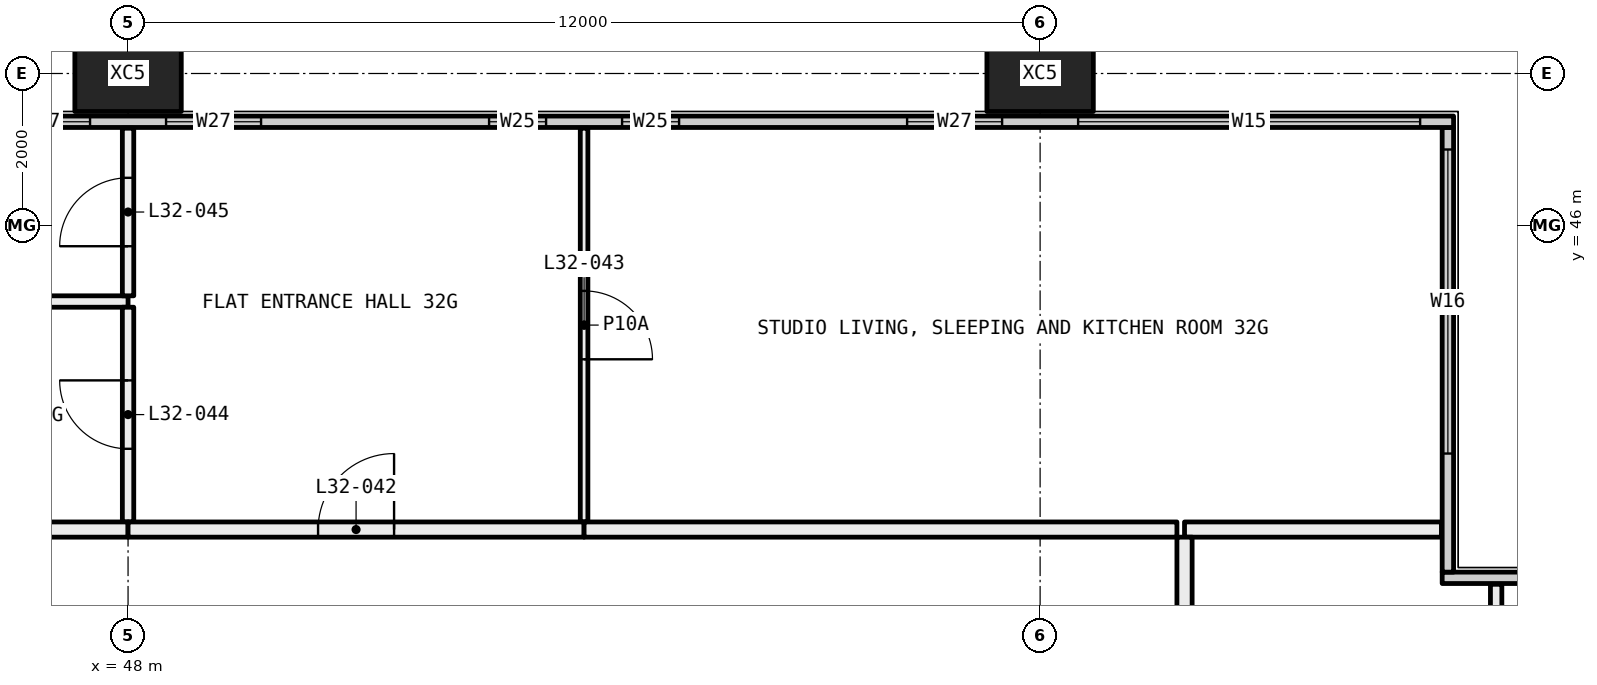
"""IFC4 building model, lengths in metres.
Left out: names, types, materials, properties, quantities, classifications, styles, units other than length and angle.
Written with IfcOpenShell. Run it as: python <this file> out.ifc"""

import sys

from ifc_helpers import new_model, si_unit, direction, frame, frame_2d, origin, origin_2d, place, context, subcontext, project, spatial, rectangle, hollow_rectangle, extrude, element, fill, save


model = new_model("IFC4")
c1 = context("Model", 3, precision=1e-05, world=origin(), true_north=direction((0.0, 1.0)))
c2 = subcontext(c1, "Body", "Model", "MODEL_VIEW")
j1 = project(units=[si_unit("LENGTHUNIT", "METRE"), si_unit("PLANEANGLEUNIT", "RADIAN")], contexts=[c1])
p1 = place(None, origin())
s1 = spatial("IfcSite", under=j1, at=p1, CompositionType="ELEMENT")
p2 = place(p1, origin())
s2 = spatial("IfcBuilding", under=s1, at=p2, CompositionType="ELEMENT")
p3 = place(p2, frame((0.0, 0.0, 124.2)))
s3 = spatial("IfcBuildingStorey", under=s2, at=p3, CompositionType="ELEMENT", Elevation=124.2)
for number, where, z_axis, x_axis in (
    (1, (48.0, 48.0, -0.4), (0.0, 0.0, 1.0), (1.0, 0.0, 0.0)),
    (2, (60.0, 48.0, -0.4), (0.0, 0.0, 1.0), (1.0, 0.0, 0.0)),
):
    element("IfcColumn", number, at=place(p3, frame(where, z_axis=z_axis, x_axis=x_axis)), inside=s3, PredefinedType="COLUMN", context=c2, shape_type="SweptSolid", body=[
        extrude(hollow_rectangle(XDim=1.4, YDim=1.0, WallThickness=0.055, at=origin_2d()), origin(), (0.0, 0.0, 1.0), 3.45),
    ])
p4 = place(p3, frame((65.29, 41.365, 0.0), z_axis=(0.0, 0.0, 1.0), x_axis=(1.0, 0.0, 0.0)))
e3 = element("IfcWall", 3, at=p4, inside=s3, PredefinedType="ELEMENTEDWALL", context=c2, shape_type="SweptSolid", body=[
    extrude(rectangle(XDim=6.15, YDim=0.15, at=frame_2d((3.075, 0.0))), origin(), (0.0, 0.0, 1.0), 3.05),
])
p5 = place(p4, frame((1.71, 0.0, 0.45)))
e4 = element("IfcOpeningElement", 4, at=p5, cuts=e3, PredefinedType="OPENING", context=c2, shape_type="SweptSolid", body=[
    extrude(rectangle(XDim=4.0, YDim=2.55, at=frame_2d((2.0, 1.275))), frame((0.0, 0.085, 0.0), z_axis=(0.0, -1.0, 0.0), x_axis=(1.0, 0.0, 0.0)), (0.0, 0.0, 1.0), 0.17),
])
p6 = place(p3, frame((65.365, 41.44, 0.0), z_axis=(0.0, 0.0, 1.0), x_axis=(0.0, 1.0, 0.0)))
e5 = element("IfcWall", 5, at=p6, inside=s3, PredefinedType="ELEMENTEDWALL", context=c2, shape_type="SweptSolid", body=[
    extrude(rectangle(XDim=5.85, YDim=0.15, at=frame_2d((2.925, 0.0))), origin(), (0.0, 0.0, 1.0), 3.05),
])
p7 = place(p6, frame((1.56, 0.0, 0.45)))
e6 = element("IfcOpeningElement", 6, at=p7, cuts=e5, PredefinedType="OPENING", context=c2, shape_type="SweptSolid", body=[
    extrude(rectangle(XDim=4.0, YDim=2.55, at=frame_2d((2.0, 1.275))), frame((0.0, 0.085, 0.0), z_axis=(0.0, -1.0, 0.0), x_axis=(1.0, 0.0, 0.0)), (0.0, 0.0, 1.0), 0.17),
])
p8 = place(p3, frame((6.56, 47.365, 0.0), z_axis=(0.0, 0.0, 1.0), x_axis=(1.0, 0.0, 0.0)))
e7 = element("IfcWall", 7, at=p8, inside=s3, PredefinedType="ELEMENTEDWALL", context=c2, shape_type="SweptSolid", body=[
    extrude(rectangle(XDim=58.88, YDim=0.15, at=frame_2d((29.44, 0.0))), origin(), (0.0, 0.0, 1.0), 3.05),
])
p9 = place(p8, frame((0.44, 0.0, 0.45)))
e8 = element("IfcOpeningElement", 8, at=p9, cuts=e7, PredefinedType="OPENING", context=c2, shape_type="SweptSolid", body=[
    extrude(rectangle(XDim=4.5, YDim=2.55, at=frame_2d((2.25, 1.275))), frame((0.0, 0.085, 0.0), z_axis=(0.0, -1.0, 0.0), x_axis=(1.0, 0.0, 0.0)), (0.0, 0.0, 1.0), 0.17),
])
p10 = place(p8, frame((5.94, 0.0, 0.45)))
e9 = element("IfcOpeningElement", 9, at=p10, cuts=e7, PredefinedType="OPENING", context=c2, shape_type="SweptSolid", body=[
    extrude(rectangle(XDim=1.25, YDim=2.55, at=frame_2d((0.625, 1.275))), frame((0.0, 0.085, 0.0), z_axis=(0.0, -1.0, 0.0), x_axis=(1.0, 0.0, 0.0)), (0.0, 0.0, 1.0), 0.17),
])
p11 = place(p8, frame((10.19, 0.0, 0.45)))
e10 = element("IfcOpeningElement", 10, at=p11, cuts=e7, PredefinedType="OPENING", context=c2, shape_type="SweptSolid", body=[
    extrude(rectangle(XDim=0.75, YDim=2.55, at=frame_2d((0.375, 1.275))), frame((0.0, 0.085, 0.0), z_axis=(0.0, -1.0, 0.0), x_axis=(1.0, 0.0, 0.0)), (0.0, 0.0, 1.0), 0.17),
])
p12 = place(p8, frame((11.94, 0.0, 0.45)))
e11 = element("IfcOpeningElement", 11, at=p12, cuts=e7, PredefinedType="OPENING", context=c2, shape_type="SweptSolid", body=[
    extrude(rectangle(XDim=0.75, YDim=2.55, at=frame_2d((0.375, 1.275))), frame((0.0, 0.085, 0.0), z_axis=(0.0, -1.0, 0.0), x_axis=(1.0, 0.0, 0.0)), (0.0, 0.0, 1.0), 0.17),
])
p13 = place(p8, frame((15.69, 0.0, 0.45)))
e12 = element("IfcOpeningElement", 12, at=p13, cuts=e7, PredefinedType="OPENING", context=c2, shape_type="SweptSolid", body=[
    extrude(rectangle(XDim=1.25, YDim=2.55, at=frame_2d((0.625, 1.275))), frame((0.0, 0.085, 0.0), z_axis=(0.0, -1.0, 0.0), x_axis=(1.0, 0.0, 0.0)), (0.0, 0.0, 1.0), 0.17),
])
p14 = place(p8, frame((17.94, 0.0, 0.45)))
e13 = element("IfcOpeningElement", 13, at=p14, cuts=e7, PredefinedType="OPENING", context=c2, shape_type="SweptSolid", body=[
    extrude(rectangle(XDim=1.25, YDim=2.55, at=frame_2d((0.625, 1.275))), frame((0.0, 0.085, 0.0), z_axis=(0.0, -1.0, 0.0), x_axis=(1.0, 0.0, 0.0)), (0.0, 0.0, 1.0), 0.17),
])
p15 = place(p8, frame((22.19, 0.0, 0.45)))
e14 = element("IfcOpeningElement", 14, at=p15, cuts=e7, PredefinedType="OPENING", context=c2, shape_type="SweptSolid", body=[
    extrude(rectangle(XDim=0.75, YDim=2.55, at=frame_2d((0.375, 1.275))), frame((0.0, 0.085, 0.0), z_axis=(0.0, -1.0, 0.0), x_axis=(1.0, 0.0, 0.0)), (0.0, 0.0, 1.0), 0.17),
])
p16 = place(p8, frame((23.94, 0.0, 0.45)))
e15 = element("IfcOpeningElement", 15, at=p16, cuts=e7, PredefinedType="OPENING", context=c2, shape_type="SweptSolid", body=[
    extrude(rectangle(XDim=0.75, YDim=2.55, at=frame_2d((0.375, 1.275))), frame((0.0, 0.085, 0.0), z_axis=(0.0, -1.0, 0.0), x_axis=(1.0, 0.0, 0.0)), (0.0, 0.0, 1.0), 0.17),
])
p17 = place(p8, frame((27.69, 0.0, 0.45)))
e16 = element("IfcOpeningElement", 16, at=p17, cuts=e7, PredefinedType="OPENING", context=c2, shape_type="SweptSolid", body=[
    extrude(rectangle(XDim=1.25, YDim=2.55, at=frame_2d((0.625, 1.275))), frame((0.0, 0.085, 0.0), z_axis=(0.0, -1.0, 0.0), x_axis=(1.0, 0.0, 0.0)), (0.0, 0.0, 1.0), 0.17),
])
p18 = place(p8, frame((29.94, 0.0, 0.45)))
e17 = element("IfcOpeningElement", 17, at=p18, cuts=e7, PredefinedType="OPENING", context=c2, shape_type="SweptSolid", body=[
    extrude(rectangle(XDim=1.25, YDim=2.55, at=frame_2d((0.625, 1.275))), frame((0.0, 0.085, 0.0), z_axis=(0.0, -1.0, 0.0), x_axis=(1.0, 0.0, 0.0)), (0.0, 0.0, 1.0), 0.17),
])
p19 = place(p8, frame((34.19, 0.0, 0.45)))
e18 = element("IfcOpeningElement", 18, at=p19, cuts=e7, PredefinedType="OPENING", context=c2, shape_type="SweptSolid", body=[
    extrude(rectangle(XDim=0.75, YDim=2.55, at=frame_2d((0.375, 1.275))), frame((0.0, 0.085, 0.0), z_axis=(0.0, -1.0, 0.0), x_axis=(1.0, 0.0, 0.0)), (0.0, 0.0, 1.0), 0.17),
])
p20 = place(p8, frame((35.94, 0.0, 0.45)))
e19 = element("IfcOpeningElement", 19, at=p20, cuts=e7, PredefinedType="OPENING", context=c2, shape_type="SweptSolid", body=[
    extrude(rectangle(XDim=0.75, YDim=2.55, at=frame_2d((0.375, 1.275))), frame((0.0, 0.085, 0.0), z_axis=(0.0, -1.0, 0.0), x_axis=(1.0, 0.0, 0.0)), (0.0, 0.0, 1.0), 0.17),
])
p21 = place(p8, frame((39.69, 0.0, 0.45)))
e20 = element("IfcOpeningElement", 20, at=p21, cuts=e7, PredefinedType="OPENING", context=c2, shape_type="SweptSolid", body=[
    extrude(rectangle(XDim=1.25, YDim=2.55, at=frame_2d((0.625, 1.275))), frame((0.0, 0.085, 0.0), z_axis=(0.0, -1.0, 0.0), x_axis=(1.0, 0.0, 0.0)), (0.0, 0.0, 1.0), 0.17),
])
p22 = place(p8, frame((41.94, 0.0, 0.45)))
e21 = element("IfcOpeningElement", 21, at=p22, cuts=e7, PredefinedType="OPENING", context=c2, shape_type="SweptSolid", body=[
    extrude(rectangle(XDim=1.25, YDim=2.55, at=frame_2d((0.625, 1.275))), frame((0.0, 0.085, 0.0), z_axis=(0.0, -1.0, 0.0), x_axis=(1.0, 0.0, 0.0)), (0.0, 0.0, 1.0), 0.17),
])
p23 = place(p8, frame((46.19, 0.0, 0.45)))
e22 = element("IfcOpeningElement", 22, at=p23, cuts=e7, PredefinedType="OPENING", context=c2, shape_type="SweptSolid", body=[
    extrude(rectangle(XDim=0.75, YDim=2.55, at=frame_2d((0.375, 1.275))), frame((0.0, 0.085, 0.0), z_axis=(0.0, -1.0, 0.0), x_axis=(1.0, 0.0, 0.0)), (0.0, 0.0, 1.0), 0.17),
])
p24 = place(p8, frame((47.94, 0.0, 0.45)))
e23 = element("IfcOpeningElement", 23, at=p24, cuts=e7, PredefinedType="OPENING", context=c2, shape_type="SweptSolid", body=[
    extrude(rectangle(XDim=0.75, YDim=2.55, at=frame_2d((0.375, 1.275))), frame((0.0, 0.085, 0.0), z_axis=(0.0, -1.0, 0.0), x_axis=(1.0, 0.0, 0.0)), (0.0, 0.0, 1.0), 0.17),
])
p25 = place(p8, frame((51.69, 0.0, 0.45)))
e24 = element("IfcOpeningElement", 24, at=p25, cuts=e7, PredefinedType="OPENING", context=c2, shape_type="SweptSolid", body=[
    extrude(rectangle(XDim=1.25, YDim=2.55, at=frame_2d((0.625, 1.275))), frame((0.0, 0.085, 0.0), z_axis=(0.0, -1.0, 0.0), x_axis=(1.0, 0.0, 0.0)), (0.0, 0.0, 1.0), 0.17),
])
p26 = place(p8, frame((53.94, 0.0, 0.45)))
e25 = element("IfcOpeningElement", 25, at=p26, cuts=e7, PredefinedType="OPENING", context=c2, shape_type="SweptSolid", body=[
    extrude(rectangle(XDim=4.5, YDim=2.55, at=frame_2d((2.25, 1.275))), frame((0.0, 0.085, 0.0), z_axis=(0.0, -1.0, 0.0), x_axis=(1.0, 0.0, 0.0)), (0.0, 0.0, 1.0), 0.17),
])
p27 = place(p3, frame((66.0, 41.28, 0.0), z_axis=(0.0, 0.0, 1.0), x_axis=(0.0, -1.0, 0.0)))
e26 = element("IfcWall", 26, at=p27, inside=s3, PredefinedType="PARTITIONING", context=c2, shape_type="SweptSolid", body=[
    extrude(rectangle(XDim=3.78, YDim=0.15, at=frame_2d((1.89, 0.0))), origin(), (0.0, 0.0, 1.0), 3.05),
])
p28 = place(p3, frame((65.28, 42.0, 0.0), z_axis=(0.0, 0.0, 1.0), x_axis=(-1.0, 0.0, 0.0)))
e27 = element("IfcWall", 27, at=p28, inside=s3, PredefinedType="PARTITIONING", context=c2, shape_type="SweptSolid", body=[
    extrude(rectangle(XDim=3.38, YDim=0.2, at=frame_2d((1.69, 0.0))), origin(), (0.0, 0.0, 1.0), 3.05),
])
p29 = place(p3, frame((61.9, 41.9, 0.0), z_axis=(0.0, 0.0, 1.0), x_axis=(0.0, -1.0, 0.0)))
e28 = element("IfcWall", 28, at=p29, inside=s3, PredefinedType="PARTITIONING", context=c2, shape_type="SweptSolid", body=[
    extrude(rectangle(XDim=4.4, YDim=0.2, at=frame_2d((2.2, 0.0))), origin(), (0.0, 0.0, 1.0), 3.05),
])
p30 = place(p3, frame((48.0, 45.0, 0.0), z_axis=(0.0, 0.0, 1.0), x_axis=(-1.0, 0.0, 0.0)))
e29 = element("IfcWall", 29, at=p30, inside=s3, PredefinedType="PARTITIONING", context=c2, shape_type="SweptSolid", body=[
    extrude(rectangle(XDim=5.9, YDim=0.15, at=frame_2d((2.95, 0.0))), origin(), (0.0, 0.0, 1.0), 3.05),
])
p31 = place(p3, frame((48.0, 42.1, 0.0), z_axis=(0.0, 0.0, 1.0), x_axis=(0.0, 1.0, 0.0)))
e30 = element("IfcWall", 30, at=p31, inside=s3, PredefinedType="PARTITIONING", context=c2, shape_type="SweptSolid", body=[
    extrude(rectangle(XDim=2.825, YDim=0.15, at=frame_2d((1.413, 0.0))), origin(), (0.0, 0.0, 1.0), 3.05),
])
p32 = place(p31, frame((0.962, 0.0, 0.0)))
e31 = element("IfcOpeningElement", 31, at=p32, cuts=e30, PredefinedType="OPENING", context=c2, shape_type="SweptSolid", body=[
    extrude(rectangle(XDim=0.9, YDim=2.1, at=frame_2d((0.45, 1.05))), frame((0.0, 0.085, 0.0), z_axis=(0.0, -1.0, 0.0), x_axis=(1.0, 0.0, 0.0)), (0.0, 0.0, 1.0), 0.17),
])
p33 = place(p3, frame((46.1, 42.0, 0.0), z_axis=(0.0, 0.0, 1.0), x_axis=(1.0, 0.0, 0.0)))
e32 = element("IfcWall", 32, at=p33, inside=s3, PredefinedType="PARTITIONING", context=c2, shape_type="SweptSolid", body=[
    extrude(rectangle(XDim=1.9, YDim=0.2, at=frame_2d((0.95, 0.0))), origin(), (0.0, 0.0, 1.0), 3.05),
])
p34 = place(p3, frame((48.0, 45.075, 0.0), z_axis=(0.0, 0.0, 1.0), x_axis=(0.0, 1.0, 0.0)))
e33 = element("IfcWall", 33, at=p34, inside=s3, PredefinedType="PARTITIONING", context=c2, shape_type="SweptSolid", body=[
    extrude(rectangle(XDim=2.205, YDim=0.15, at=frame_2d((1.103, 0.0))), origin(), (0.0, 0.0, 1.0), 3.05),
])
p35 = place(p34, frame((0.653, 0.0, 0.0)))
e34 = element("IfcOpeningElement", 34, at=p35, cuts=e33, PredefinedType="OPENING", context=c2, shape_type="SweptSolid", body=[
    extrude(rectangle(XDim=0.9, YDim=2.1, at=frame_2d((0.45, 1.05))), frame((0.0, 0.085, 0.0), z_axis=(0.0, -1.0, 0.0), x_axis=(1.0, 0.0, 0.0)), (0.0, 0.0, 1.0), 0.17),
])
p36 = place(p3, frame((54.0, 42.1, 0.0), z_axis=(0.0, 0.0, 1.0), x_axis=(0.0, 1.0, 0.0)))
e35 = element("IfcWall", 35, at=p36, inside=s3, PredefinedType="PARTITIONING", context=c2, shape_type="SweptSolid", body=[
    extrude(rectangle(XDim=5.18, YDim=0.1, at=frame_2d((2.59, 0.0))), origin(), (0.0, 0.0, 1.0), 3.05),
])
p37 = place(p36, frame((2.14, 0.0, 0.0)))
e36 = element("IfcOpeningElement", 36, at=p37, cuts=e35, PredefinedType="OPENING", context=c2, shape_type="SweptSolid", body=[
    extrude(rectangle(XDim=0.9, YDim=2.1, at=frame_2d((0.45, 1.05))), frame((0.0, 0.06, 0.0), z_axis=(0.0, -1.0, 0.0), x_axis=(1.0, 0.0, 0.0)), (0.0, 0.0, 1.0), 0.12),
])
p38 = place(p3, frame((48.0, 42.0, 0.0), z_axis=(0.0, 0.0, 1.0), x_axis=(1.0, 0.0, 0.0)))
e37 = element("IfcWall", 37, at=p38, inside=s3, PredefinedType="PARTITIONING", context=c2, shape_type="SweptSolid", body=[
    extrude(rectangle(XDim=6.0, YDim=0.2, at=frame_2d((3.0, 0.0))), origin(), (0.0, 0.0, 1.0), 3.05),
])
p39 = place(p38, frame((2.5, 0.0, 0.0)))
e38 = element("IfcOpeningElement", 38, at=p39, cuts=e37, PredefinedType="OPENING", context=c2, shape_type="SweptSolid", body=[
    extrude(rectangle(XDim=1.0, YDim=2.1, at=frame_2d((0.5, 1.05))), frame((0.0, 0.11, 0.0), z_axis=(0.0, -1.0, 0.0), x_axis=(1.0, 0.0, 0.0)), (0.0, 0.0, 1.0), 0.22),
])
p40 = place(p3, frame((54.0, 42.0, 0.0), z_axis=(0.0, 0.0, 1.0), x_axis=(1.0, 0.0, 0.0)))
e39 = element("IfcWall", 39, at=p40, inside=s3, PredefinedType="PARTITIONING", context=c2, shape_type="SweptSolid", body=[
    extrude(rectangle(XDim=7.8, YDim=0.2, at=frame_2d((3.9, 0.0))), origin(), (0.0, 0.0, 1.0), 3.05),
])
p41 = place(p7, origin())
e40 = element("IfcWindow", 40, at=p41, inside=s3, PartitioningType="SINGLE_PANEL", PredefinedType="WINDOW", context=c2, shape_type="SweptSolid", body=[
    extrude(rectangle(XDim=4.0, YDim=2.55, at=frame_2d((2.0, 1.275))), frame((0.0, 0.03, 0.0), z_axis=(0.0, -1.0, 0.0), x_axis=(1.0, 0.0, 0.0)), (0.0, 0.0, 1.0), 0.06),
])
fill(e6, e40)
p42 = place(p21, origin())
e41 = element("IfcWindow", 41, at=p42, inside=s3, PartitioningType="SINGLE_PANEL", PredefinedType="WINDOW", context=c2, shape_type="SweptSolid", body=[
    extrude(rectangle(XDim=1.25, YDim=2.55, at=frame_2d((0.625, 1.275))), frame((0.0, 0.03, 0.0), z_axis=(0.0, -1.0, 0.0), x_axis=(1.0, 0.0, 0.0)), (0.0, 0.0, 1.0), 0.06),
])
fill(e20, e41)
p43 = place(p22, origin())
e42 = element("IfcWindow", 42, at=p43, inside=s3, PartitioningType="SINGLE_PANEL", PredefinedType="WINDOW", context=c2, shape_type="SweptSolid", body=[
    extrude(rectangle(XDim=1.25, YDim=2.55, at=frame_2d((0.625, 1.275))), frame((0.0, 0.03, 0.0), z_axis=(0.0, -1.0, 0.0), x_axis=(1.0, 0.0, 0.0)), (0.0, 0.0, 1.0), 0.06),
])
fill(e21, e42)
p44 = place(p23, origin())
e43 = element("IfcWindow", 43, at=p44, inside=s3, PartitioningType="SINGLE_PANEL", PredefinedType="WINDOW", context=c2, shape_type="SweptSolid", body=[
    extrude(rectangle(XDim=0.75, YDim=2.55, at=frame_2d((0.375, 1.275))), frame((0.0, 0.03, 0.0), z_axis=(0.0, -1.0, 0.0), x_axis=(1.0, 0.0, 0.0)), (0.0, 0.0, 1.0), 0.06),
])
fill(e22, e43)
p45 = place(p24, origin())
e44 = element("IfcWindow", 44, at=p45, inside=s3, PartitioningType="SINGLE_PANEL", PredefinedType="WINDOW", context=c2, shape_type="SweptSolid", body=[
    extrude(rectangle(XDim=0.75, YDim=2.55, at=frame_2d((0.375, 1.275))), frame((0.0, 0.03, 0.0), z_axis=(0.0, -1.0, 0.0), x_axis=(1.0, 0.0, 0.0)), (0.0, 0.0, 1.0), 0.06),
])
fill(e23, e44)
p46 = place(p25, origin())
e45 = element("IfcWindow", 45, at=p46, inside=s3, PartitioningType="SINGLE_PANEL", PredefinedType="WINDOW", context=c2, shape_type="SweptSolid", body=[
    extrude(rectangle(XDim=1.25, YDim=2.55, at=frame_2d((0.625, 1.275))), frame((0.0, 0.03, 0.0), z_axis=(0.0, -1.0, 0.0), x_axis=(1.0, 0.0, 0.0)), (0.0, 0.0, 1.0), 0.06),
])
fill(e24, e45)
p47 = place(p26, origin())
e46 = element("IfcWindow", 46, at=p47, inside=s3, PartitioningType="SINGLE_PANEL", PredefinedType="WINDOW", context=c2, shape_type="SweptSolid", body=[
    extrude(rectangle(XDim=4.5, YDim=2.55, at=frame_2d((2.25, 1.275))), frame((0.0, 0.03, 0.0), z_axis=(0.0, -1.0, 0.0), x_axis=(1.0, 0.0, 0.0)), (0.0, 0.0, 1.0), 0.06),
])
fill(e25, e46)
p48 = place(p39, origin())
e47 = element("IfcDoor", 47, at=p48, inside=s3, OperationType="SINGLE_SWING_LEFT", PredefinedType="DOOR", context=c2, shape_type="SweptSolid", body=[
    extrude(rectangle(XDim=1.0, YDim=2.1, at=frame_2d((0.5, 1.05))), frame((0.0, 0.025, 0.0), z_axis=(0.0, -1.0, 0.0), x_axis=(1.0, 0.0, 0.0)), (0.0, 0.0, 1.0), 0.05),
])
fill(e38, e47)
p49 = place(p37, frame((0.9, 0.0, 0.0), x_axis=(-1.0, 0.0, 0.0)))
e48 = element("IfcDoor", 48, at=p49, inside=s3, OperationType="SINGLE_SWING_LEFT", PredefinedType="DOOR", context=c2, shape_type="SweptSolid", body=[
    extrude(rectangle(XDim=0.9, YDim=2.1, at=frame_2d((0.45, 1.05))), frame((0.0, 0.025, 0.0), z_axis=(0.0, -1.0, 0.0), x_axis=(1.0, 0.0, 0.0)), (0.0, 0.0, 1.0), 0.05),
])
fill(e36, e48)
p50 = place(p32, origin())
e49 = element("IfcDoor", 49, at=p50, inside=s3, OperationType="SINGLE_SWING_LEFT", PredefinedType="DOOR", context=c2, shape_type="SweptSolid", body=[
    extrude(rectangle(XDim=0.9, YDim=2.1, at=frame_2d((0.45, 1.05))), frame((0.0, 0.025, 0.0), z_axis=(0.0, -1.0, 0.0), x_axis=(1.0, 0.0, 0.0)), (0.0, 0.0, 1.0), 0.05),
])
fill(e31, e49)
p51 = place(p35, origin())
e50 = element("IfcDoor", 50, at=p51, inside=s3, OperationType="SINGLE_SWING_RIGHT", PredefinedType="DOOR", context=c2, shape_type="SweptSolid", body=[
    extrude(rectangle(XDim=0.9, YDim=2.1, at=frame_2d((0.45, 1.05))), frame((0.0, 0.025, 0.0), z_axis=(0.0, -1.0, 0.0), x_axis=(1.0, 0.0, 0.0)), (0.0, 0.0, 1.0), 0.05),
])
fill(e34, e50)
save(model, sys.argv[1])
